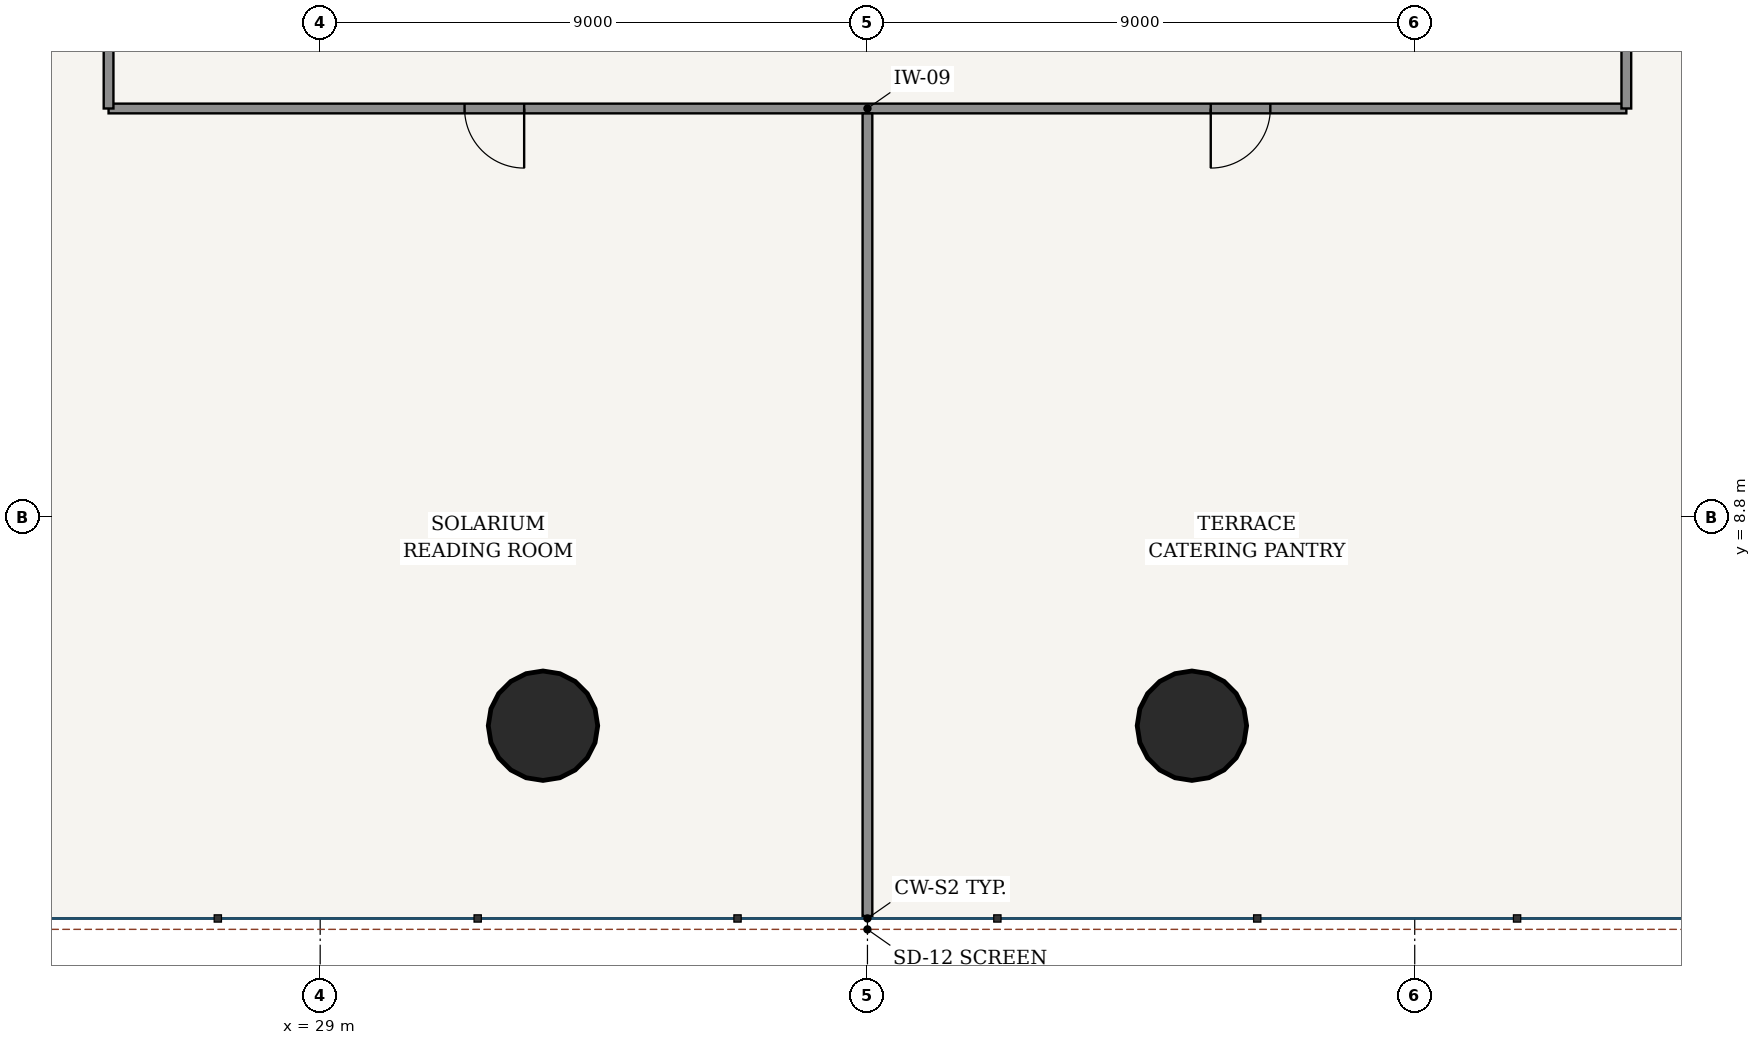
"""IFC4 building model, lengths in metres.
Left out: names, types, materials, properties, quantities, classifications, styles, units other than length and angle.
Written with IfcOpenShell. Run it as: python <this file> out.ifc"""

import sys

from ifc_helpers import new_model, si_unit, direction, frame, frame_2d, origin, origin_2d, place, context, subcontext, project, spatial, rectangle, hollow_circle, extrude, source, transform, mapped, element, fill, save


model = new_model("IFC4")
c1 = context("Model", 3, precision=1e-05, world=origin(), true_north=direction((-0.2419218956, 0.970295726276)))
c2 = subcontext(c1, "Body", "Model", "MODEL_VIEW")
j1 = project(units=[si_unit("LENGTHUNIT", "METRE"), si_unit("PLANEANGLEUNIT", "RADIAN")], contexts=[c1])
p1 = place(None, origin())
s1 = spatial("IfcSite", under=j1, at=p1, CompositionType="ELEMENT")
p2 = place(p1, origin())
s2 = spatial("IfcBuilding", under=s1, at=p2, CompositionType="ELEMENT")
p3 = place(p2, frame((0.0, 0.0, 18.9)))
s3 = spatial("IfcBuildingStorey", under=s2, at=p3, CompositionType="ELEMENT", Elevation=18.9)
for number, where, z_axis, x_axis in (
    (1, (32.664, 5.37, 0.0), (0.0, 0.0, 1.0), (1.0, 0.0, 0.0)),
    (2, (43.336, 5.37, 0.0), (0.0, 0.0, 1.0), (1.0, 0.0, 0.0)),
):
    element("IfcColumn", number, at=place(p3, frame(where, z_axis=z_axis, x_axis=x_axis)), inside=s3, PredefinedType="COLUMN", context=c2, shape_type="SweptSolid", body=[
        extrude(hollow_circle(Radius=0.9, WallThickness=0.055, at=origin_2d()), origin(), (0.0, 0.0, 1.0), 5.1),
    ])
p4 = place(p3, frame((25.52, 15.52, 0.0), z_axis=(0.0, 0.0, 1.0), x_axis=(1.0, 0.0, 0.0)))
e3 = element("IfcWall", 3, at=p4, inside=s3, PredefinedType="PARTITIONING", context=c2, shape_type="SweptSolid", body=[
    extrude(rectangle(XDim=24.96, YDim=0.16, at=frame_2d((12.48, 0.0))), origin(), (0.0, 0.0, 1.0), 4.188),
])
p5 = place(p4, frame((5.854, 0.0, 0.0)))
e4 = element("IfcOpeningElement", 4, at=p5, cuts=e3, PredefinedType="OPENING", context=c2, shape_type="SweptSolid", body=[
    extrude(rectangle(XDim=0.98, YDim=2.2, at=frame_2d((0.49, 1.1))), frame((0.0, 0.09, 0.0), z_axis=(0.0, -1.0, 0.0), x_axis=(1.0, 0.0, 0.0)), (0.0, 0.0, 1.0), 0.18),
])
p6 = place(p4, frame((18.125, 0.0, 0.0)))
e5 = element("IfcOpeningElement", 5, at=p6, cuts=e3, PredefinedType="OPENING", context=c2, shape_type="SweptSolid", body=[
    extrude(rectangle(XDim=0.98, YDim=2.2, at=frame_2d((0.49, 1.1))), frame((0.0, 0.09, 0.0), z_axis=(0.0, -1.0, 0.0), x_axis=(1.0, 0.0, 0.0)), (0.0, 0.0, 1.0), 0.18),
])
p7 = place(p3, frame((25.52, 15.52, 0.0), z_axis=(0.0, 0.0, 1.0), x_axis=(0.0, 1.0, 0.0)))
e6 = element("IfcWall", 6, at=p7, inside=s3, PredefinedType="PARTITIONING", context=c2, shape_type="SweptSolid", body=[
    extrude(rectangle(XDim=21.56, YDim=0.16, at=frame_2d((10.78, 0.0))), origin(), (0.0, 0.0, 1.0), 4.188),
])
p8 = place(p7, frame((5.254, 0.0, 0.0)))
e7 = element("IfcOpeningElement", 7, at=p8, cuts=e6, PredefinedType="OPENING", context=c2, shape_type="SweptSolid", body=[
    extrude(rectangle(XDim=0.98, YDim=2.2, at=frame_2d((0.49, 1.1))), frame((0.0, 0.09, 0.0), z_axis=(0.0, -1.0, 0.0), x_axis=(1.0, 0.0, 0.0)), (0.0, 0.0, 1.0), 0.18),
])
p9 = place(p3, frame((50.48, 15.52, 0.0), z_axis=(0.0, 0.0, 1.0), x_axis=(0.0, 1.0, 0.0)))
e8 = element("IfcWall", 8, at=p9, inside=s3, PredefinedType="PARTITIONING", context=c2, shape_type="SweptSolid", body=[
    extrude(rectangle(XDim=21.56, YDim=0.16, at=frame_2d((10.78, 0.0))), origin(), (0.0, 0.0, 1.0), 4.188),
])
p10 = place(p9, frame((5.254, 0.0, 0.0)))
e9 = element("IfcOpeningElement", 9, at=p10, cuts=e8, PredefinedType="OPENING", context=c2, shape_type="SweptSolid", body=[
    extrude(rectangle(XDim=0.98, YDim=2.2, at=frame_2d((0.49, 1.1))), frame((0.0, 0.09, 0.0), z_axis=(0.0, -1.0, 0.0), x_axis=(1.0, 0.0, 0.0)), (0.0, 0.0, 1.0), 0.18),
])
p11 = place(p3, frame((38.0, 2.24, 0.0), z_axis=(0.0, 0.0, 1.0), x_axis=(0.0, 1.0, 0.0)))
e10 = element("IfcWall", 10, at=p11, inside=s3, PredefinedType="PARTITIONING", context=c2, shape_type="SweptSolid", body=[
    extrude(rectangle(XDim=13.198, YDim=0.16, at=frame_2d((6.599, 0.0))), origin(), (0.0, 0.0, 1.0), 4.262),
])
m1 = source(origin(), c2, "Body", "SweptSolid", [
    extrude(rectangle(XDim=0.98, YDim=2.2, at=frame_2d((0.49, 1.1))), frame((0.0, 0.025, 0.0), z_axis=(0.0, -1.0, 0.0), x_axis=(1.0, 0.0, 0.0)), (0.0, 0.0, 1.0), 0.05),
])
p12 = place(p5, frame((0.98, 0.0, 0.0), z_axis=(0.0, 0.0, 1.0), x_axis=(-1.0, 0.0, 0.0)))
e11 = element("IfcDoor", 11, at=p12, inside=s3, OperationType="SINGLE_SWING_LEFT", PredefinedType="DOOR", context=c2, shape_type="MappedRepresentation", body=[
    mapped(m1, transform((0.0, 0.0, 0.0), scale=1.0)),
])
fill(e4, e11)
p13 = place(p6, frame((0.98, 0.0, 0.0), z_axis=(0.0, 0.0, 1.0), x_axis=(-1.0, 0.0, 0.0)))
e12 = element("IfcDoor", 12, at=p13, inside=s3, OperationType="SINGLE_SWING_RIGHT", PredefinedType="DOOR", context=c2, shape_type="MappedRepresentation", body=[
    mapped(m1, transform((0.0, 0.0, 0.0), scale=1.0)),
])
fill(e5, e12)
save(model, sys.argv[1])
